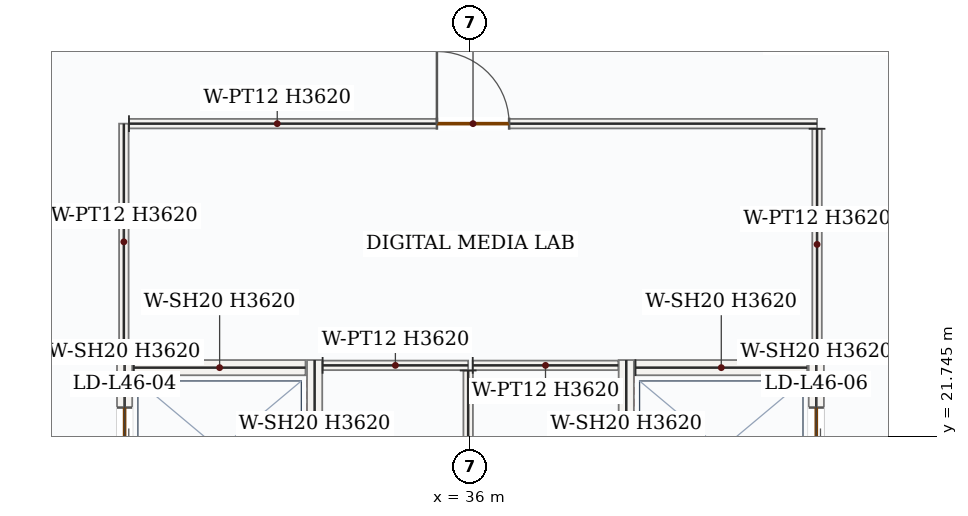
"""IFC4 building model, lengths in metres.
Left out: names, types, materials, properties, quantities, classifications, styles, units other than length and angle.
Written with IfcOpenShell. Run it as: python <this file> out.ifc"""

import sys

from ifc_helpers import new_model, si_unit, direction, frame, frame_2d, origin, place, context, subcontext, project, spatial, rectangle, extrude, source, transform, mapped, element, fill, save


model = new_model("IFC4")
c1 = context("Model", 3, precision=1e-05, world=origin(), true_north=direction((0.0, 1.0)))
c2 = subcontext(c1, "Body", "Model", "MODEL_VIEW")
j1 = project(units=[si_unit("LENGTHUNIT", "METRE"), si_unit("PLANEANGLEUNIT", "RADIAN")], contexts=[c1])
p1 = place(None, origin())
s1 = spatial("IfcSite", under=j1, at=p1, CompositionType="ELEMENT")
p2 = place(p1, origin())
s2 = spatial("IfcBuilding", under=s1, at=p2, CompositionType="ELEMENT")
p3 = place(p2, frame((0.0, 0.0, 198.0)))
s3 = spatial("IfcBuildingStorey", under=s2, at=p3, CompositionType="ELEMENT", Elevation=198.0)
p4 = place(p3, frame((31.45, 20.4, 0.0), z_axis=(0.0, 0.0, 1.0), x_axis=(0.0, 1.0, 0.0)))
e1 = element("IfcWall", 1, at=p4, inside=s3, PredefinedType="SOLIDWALL", context=c2, shape_type="SweptSolid", body=[
    extrude(rectangle(XDim=2.35, YDim=0.2, at=frame_2d((1.175, 0.0))), origin(), (0.0, 0.0, 1.0), 3.62),
])
p5 = place(p4, frame((0.625, 0.0, 0.0)))
e2 = element("IfcOpeningElement", 2, at=p5, cuts=e1, PredefinedType="OPENING", context=c2, shape_type="SweptSolid", body=[
    extrude(rectangle(XDim=1.1, YDim=2.15, at=frame_2d((0.55, 1.075))), frame((0.0, 0.11, 0.0), z_axis=(0.0, -1.0, 0.0), x_axis=(1.0, 0.0, 0.0)), (0.0, 0.0, 1.0), 0.22),
])
m1 = source(origin(), c2, "Body", "SweptSolid", [
    extrude(rectangle(XDim=2.35, YDim=0.2, at=frame_2d((1.175, 0.0))), origin(), (0.0, 0.0, 1.0), 3.62),
])
p6 = place(p3, frame((33.95, 20.4, 0.0), z_axis=(0.0, 0.0, 1.0), x_axis=(0.0, 1.0, 0.0)))
e3 = element("IfcWall", 3, at=p6, inside=s3, PredefinedType="SOLIDWALL", context=c2, shape_type="MappedRepresentation", body=[
    mapped(m1, transform((0.0, 0.0, 0.0), x_axis=(1.0, 0.0, 0.0), y_axis=(0.0, 1.0, 0.0), z_axis=(0.0, 0.0, 1.0), scale=1.0)),
])
m2 = source(origin(), c2, "Body", "SweptSolid", [
    extrude(rectangle(XDim=2.26, YDim=0.2, at=frame_2d((1.13, 0.0))), origin(), (0.0, 0.0, 1.0), 3.62),
])
p7 = place(p3, frame((31.57, 22.65, 0.0), z_axis=(0.0, 0.0, 1.0), x_axis=(1.0, 0.0, 0.0)))
e4 = element("IfcWall", 4, at=p7, inside=s3, PredefinedType="SOLIDWALL", context=c2, shape_type="MappedRepresentation", body=[
    mapped(m2, transform((0.0, 0.0, 0.0), x_axis=(1.0, 0.0, 0.0), y_axis=(0.0, 1.0, 0.0), z_axis=(0.0, 0.0, 1.0), scale=1.0)),
])
p8 = place(p3, frame((38.05, 20.4, 0.0), z_axis=(0.0, 0.0, 1.0), x_axis=(0.0, 1.0, 0.0)))
e5 = element("IfcWall", 5, at=p8, inside=s3, PredefinedType="SOLIDWALL", context=c2, shape_type="MappedRepresentation", body=[
    mapped(m1, transform((0.0, 0.0, 0.0), x_axis=(1.0, 0.0, 0.0), y_axis=(0.0, 1.0, 0.0), z_axis=(0.0, 0.0, 1.0), scale=1.0)),
])
p9 = place(p3, frame((40.55, 20.4, 0.0), z_axis=(0.0, 0.0, 1.0), x_axis=(0.0, 1.0, 0.0)))
e6 = element("IfcWall", 6, at=p9, inside=s3, PredefinedType="SOLIDWALL", context=c2, shape_type="SweptSolid", body=[
    extrude(rectangle(XDim=2.35, YDim=0.2, at=frame_2d((1.175, 0.0))), origin(), (0.0, 0.0, 1.0), 3.62),
])
p10 = place(p9, frame((0.625, 0.0, 0.0)))
e7 = element("IfcOpeningElement", 7, at=p10, cuts=e6, PredefinedType="OPENING", context=c2, shape_type="SweptSolid", body=[
    extrude(rectangle(XDim=1.1, YDim=2.15, at=frame_2d((0.55, 1.075))), frame((0.0, 0.11, 0.0), z_axis=(0.0, -1.0, 0.0), x_axis=(1.0, 0.0, 0.0)), (0.0, 0.0, 1.0), 0.22),
])
p11 = place(p3, frame((38.17, 22.65, 0.0), z_axis=(0.0, 0.0, 1.0), x_axis=(1.0, 0.0, 0.0)))
e8 = element("IfcWall", 8, at=p11, inside=s3, PredefinedType="SOLIDWALL", context=c2, shape_type="MappedRepresentation", body=[
    mapped(m2, transform((0.0, 0.0, 0.0), x_axis=(1.0, 0.0, 0.0), y_axis=(0.0, 1.0, 0.0), z_axis=(0.0, 0.0, 1.0), scale=1.0)),
])
m3 = source(origin(), c2, "Body", "SweptSolid", [
    extrude(rectangle(XDim=1.915, YDim=0.125, at=frame_2d((0.958, 0.0))), origin(), (0.0, 0.0, 1.0), 3.62),
])
p12 = place(p3, frame((34.055, 22.68, 0.0), z_axis=(0.0, 0.0, 1.0), x_axis=(1.0, 0.0, 0.0)))
e9 = element("IfcWall", 9, at=p12, inside=s3, PredefinedType="PARTITIONING", context=c2, shape_type="MappedRepresentation", body=[
    mapped(m3, transform((0.0, 0.0, 0.0), x_axis=(1.0, 0.0, 0.0), y_axis=(0.0, 1.0, 0.0), z_axis=(0.0, 0.0, 1.0), scale=1.0)),
])
m4 = source(origin(), c2, "Body", "SweptSolid", [
    extrude(rectangle(XDim=4.252, YDim=0.125, at=frame_2d((2.126, 0.0))), origin(), (0.0, 0.0, 1.0), 3.62),
])
p13 = place(p3, frame((35.97, 22.613, 0.0), z_axis=(0.0, 0.0, 1.0), x_axis=(0.0, -1.0, 0.0)))
e10 = element("IfcWall", 10, at=p13, inside=s3, PredefinedType="PARTITIONING", context=c2, shape_type="MappedRepresentation", body=[
    mapped(m4, transform((0.0, 0.0, 0.0), x_axis=(1.0, 0.0, 0.0), y_axis=(0.0, 1.0, 0.0), z_axis=(0.0, 0.0, 1.0), scale=1.0)),
])
p14 = place(p3, frame((36.03, 22.68, 0.0), z_axis=(0.0, 0.0, 1.0), x_axis=(1.0, 0.0, 0.0)))
e11 = element("IfcWall", 11, at=p14, inside=s3, PredefinedType="PARTITIONING", context=c2, shape_type="MappedRepresentation", body=[
    mapped(m3, transform((0.0, 0.0, 0.0), x_axis=(1.0, 0.0, 0.0), y_axis=(0.0, 1.0, 0.0), z_axis=(0.0, 0.0, 1.0), scale=1.0)),
])
m5 = source(origin(), c2, "Body", "SweptSolid", [
    extrude(rectangle(XDim=3.11, YDim=0.125, at=frame_2d((1.555, 0.0))), origin(), (0.0, 0.0, 1.0), 3.62),
])
p15 = place(p3, frame((31.44, 22.75, 0.0), z_axis=(0.0, 0.0, 1.0), x_axis=(0.0, 1.0, 0.0)))
e12 = element("IfcWall", 12, at=p15, inside=s3, PredefinedType="PARTITIONING", context=c2, shape_type="MappedRepresentation", body=[
    mapped(m5, transform((0.0, 0.0, 0.0), x_axis=(1.0, 0.0, 0.0), y_axis=(0.0, 1.0, 0.0), z_axis=(0.0, 0.0, 1.0), scale=1.0)),
])
p16 = place(p3, frame((31.508, 25.86, 0.0), z_axis=(0.0, 0.0, 1.0), x_axis=(1.0, 0.0, 0.0)))
e13 = element("IfcWall", 13, at=p16, inside=s3, PredefinedType="PARTITIONING", context=c2, shape_type="SweptSolid", body=[
    extrude(rectangle(XDim=9.052, YDim=0.125, at=frame_2d((4.526, 0.0))), origin(), (0.0, 0.0, 1.0), 3.62),
])
p17 = place(p16, frame((4.051, 0.0, 0.0)))
e14 = element("IfcOpeningElement", 14, at=p17, cuts=e13, PredefinedType="OPENING", context=c2, shape_type="SweptSolid", body=[
    extrude(rectangle(XDim=0.95, YDim=2.15, at=frame_2d((0.475, 1.075))), frame((0.0, 0.073, 0.0), z_axis=(0.0, -1.0, 0.0), x_axis=(1.0, 0.0, 0.0)), (0.0, 0.0, 1.0), 0.145),
])
m6 = source(origin(), c2, "Body", "SweptSolid", [
    extrude(rectangle(XDim=3.042, YDim=0.125, at=frame_2d((1.521, 0.0))), origin(), (0.0, 0.0, 1.0), 3.62),
])
p18 = place(p3, frame((40.56, 25.792, 0.0), z_axis=(0.0, 0.0, 1.0), x_axis=(0.0, -1.0, 0.0)))
e15 = element("IfcWall", 15, at=p18, inside=s3, PredefinedType="PARTITIONING", context=c2, shape_type="MappedRepresentation", body=[
    mapped(m6, transform((0.0, 0.0, 0.0), x_axis=(1.0, 0.0, 0.0), y_axis=(0.0, 1.0, 0.0), z_axis=(0.0, 0.0, 1.0), scale=1.0)),
])
m7 = source(origin(), c2, "Body", "SweptSolid", [
    extrude(rectangle(XDim=1.1, YDim=2.15, at=frame_2d((0.55, 1.075))), frame((0.0, 0.025, 0.0), z_axis=(0.0, -1.0, 0.0), x_axis=(1.0, 0.0, 0.0)), (0.0, 0.0, 1.0), 0.05),
])
p19 = place(p5, origin())
e16 = element("IfcDoor", 16, at=p19, inside=s3, OperationType="DOUBLE_DOOR_SLIDING", PredefinedType="DOOR", context=c2, shape_type="MappedRepresentation", body=[
    mapped(m7, transform((0.0, 0.0, 0.0), x_axis=(1.0, 0.0, 0.0), y_axis=(0.0, 1.0, 0.0), z_axis=(0.0, 0.0, 1.0), scale=1.0)),
])
fill(e2, e16)
p20 = place(p10, origin())
e17 = element("IfcDoor", 17, at=p20, inside=s3, OperationType="DOUBLE_DOOR_SLIDING", PredefinedType="DOOR", context=c2, shape_type="MappedRepresentation", body=[
    mapped(m7, transform((0.0, 0.0, 0.0), x_axis=(1.0, 0.0, 0.0), y_axis=(0.0, 1.0, 0.0), z_axis=(0.0, 0.0, 1.0), scale=1.0)),
])
fill(e7, e17)
m8 = source(origin(), c2, "Body", "SweptSolid", [
    extrude(rectangle(XDim=0.95, YDim=2.15, at=frame_2d((0.475, 1.075))), frame((0.0, 0.025, 0.0), z_axis=(0.0, -1.0, 0.0), x_axis=(1.0, 0.0, 0.0)), (0.0, 0.0, 1.0), 0.05),
])
p21 = place(p17, origin())
e18 = element("IfcDoor", 18, at=p21, inside=s3, OperationType="SINGLE_SWING_LEFT", PredefinedType="DOOR", context=c2, shape_type="MappedRepresentation", body=[
    mapped(m8, transform((0.0, 0.0, 0.0), x_axis=(1.0, 0.0, 0.0), y_axis=(0.0, 1.0, 0.0), z_axis=(0.0, 0.0, 1.0), scale=1.0)),
])
fill(e14, e18)
save(model, sys.argv[1])
